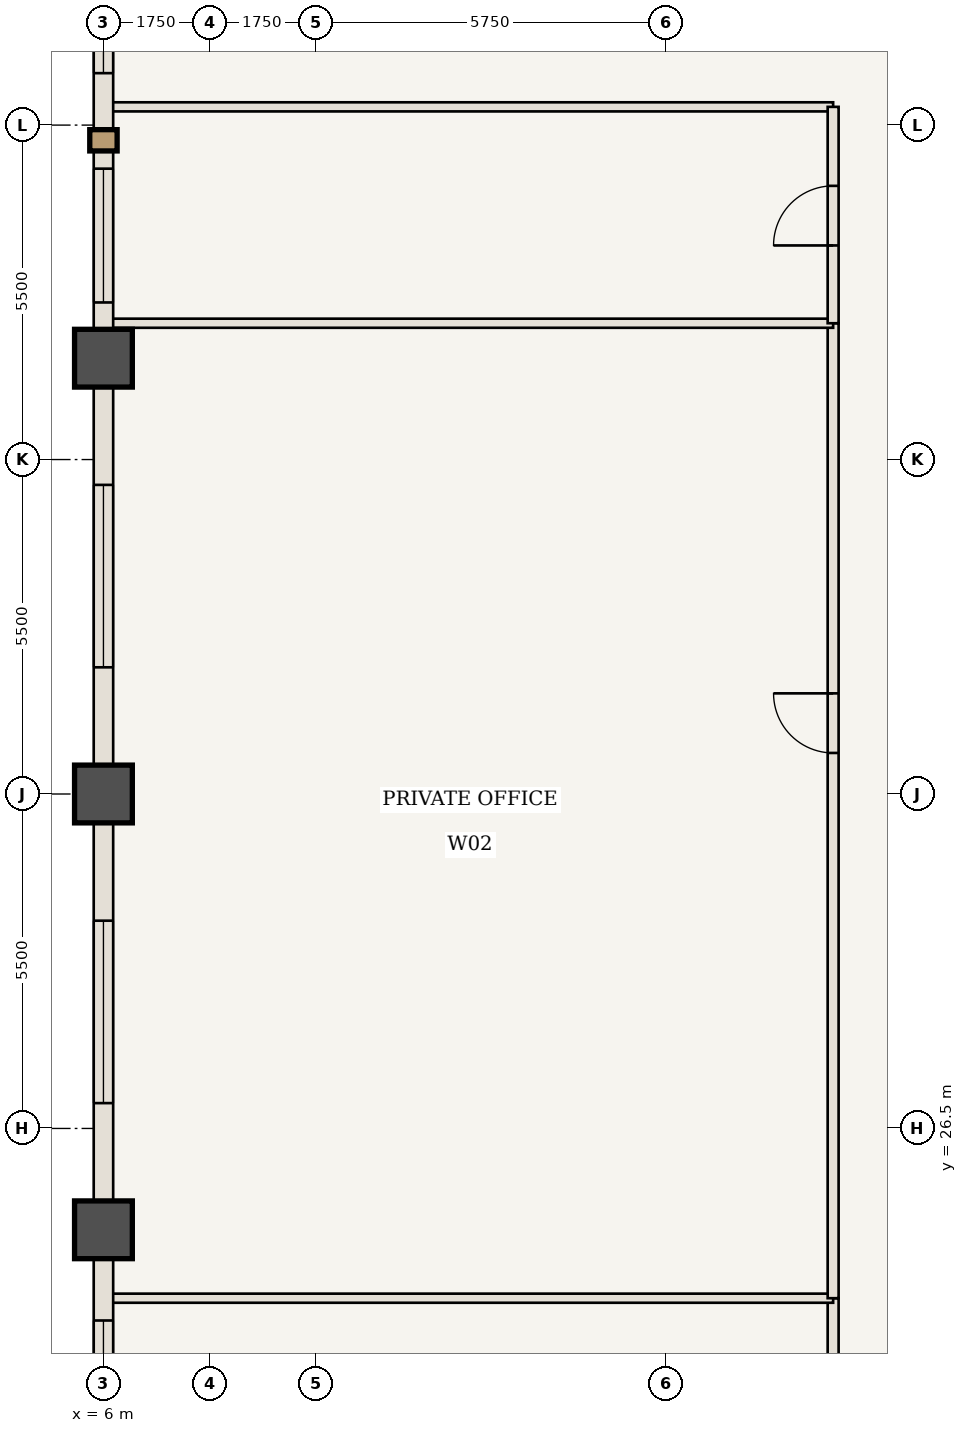
"""IFC4 building model, lengths in metres.
Left out: names, types, materials, properties, quantities, classifications, styles, units other than length and angle.
Written with IfcOpenShell. Run it as: python <this file> out.ifc"""

import sys

from ifc_helpers import new_model, si_unit, direction, frame, frame_2d, origin, origin_2d, place, context, subcontext, project, spatial, rectangle, extrude, element, fill, save


model = new_model("IFC4")
c1 = context("Model", 3, precision=1e-05, world=origin(), true_north=direction((0.0, 1.0)))
c2 = subcontext(c1, "Body", "Model", "MODEL_VIEW")
j1 = project(units=[si_unit("LENGTHUNIT", "METRE"), si_unit("PLANEANGLEUNIT", "RADIAN")], contexts=[c1])
p1 = place(None, origin())
s1 = spatial("IfcSite", under=j1, at=p1, CompositionType="ELEMENT")
p2 = place(p1, origin())
s2 = spatial("IfcBuilding", under=s1, at=p2, CompositionType="ELEMENT")
p3 = place(p2, frame((0.0, 0.0, 129.85)))
s3 = spatial("IfcBuildingStorey", under=s2, at=p3, CompositionType="ELEMENT", Elevation=129.85)
for number, where, z_axis, x_axis in (
    (1, (6.0, 24.833, 0.0), (0.0, 0.0, 1.0), (1.0, 0.0, 0.0)),
    (2, (6.0, 32.0, 0.0), (0.0, 0.0, 1.0), (1.0, 0.0, 0.0)),
    (3, (6.0, 39.167, 0.0), (0.0, 0.0, 1.0), (1.0, 0.0, 0.0)),
):
    element("IfcColumn", number, at=place(p3, frame(where, z_axis=z_axis, x_axis=x_axis)), inside=s3, PredefinedType="COLUMN", context=c2, shape_type="SweptSolid", body=[
        extrude(rectangle(XDim=0.95, YDim=0.95, at=origin_2d()), origin(), (0.0, 0.0, 1.0), 3.85),
    ])
p4 = place(p3, frame((6.06, 43.3, 0.0), z_axis=(0.0, 0.0, 1.0), x_axis=(1.0, 0.0, 0.0)))
e4 = element("IfcWall", 4, at=p4, inside=s3, PredefinedType="STANDARD", context=c2, shape_type="SweptSolid", body=[
    extrude(rectangle(XDim=11.94, YDim=0.15, at=frame_2d((5.97, 0.0))), origin(), (0.0, 0.0, 1.0), 3.065),
])
p5 = place(p3, frame((18.0, 20.7, 0.0), z_axis=(0.0, 0.0, 1.0), x_axis=(0.0, 1.0, 0.0)))
e5 = element("IfcWall", 5, at=p5, inside=s3, PredefinedType="STANDARD", context=c2, shape_type="SweptSolid", body=[
    extrude(rectangle(XDim=3.008, YDim=0.18, at=frame_2d((1.504, 0.0))), origin(), (0.0, 0.0, 1.0), 3.685),
])
p6 = place(p5, frame((1.004, 0.0, 0.0)))
e6 = element("IfcOpeningElement", 6, at=p6, cuts=e5, PredefinedType="OPENING", context=c2, shape_type="SweptSolid", body=[
    extrude(rectangle(XDim=0.98, YDim=2.2, at=frame_2d((0.49, 1.1))), frame((0.0, 0.1, 0.0), z_axis=(0.0, -1.0, 0.0), x_axis=(1.0, 0.0, 0.0)), (0.0, 0.0, 1.0), 0.2),
])
p7 = place(p3, frame((6.06, 23.708, 0.0), z_axis=(0.0, 0.0, 1.0), x_axis=(1.0, 0.0, 0.0)))
e7 = element("IfcWall", 7, at=p7, inside=s3, PredefinedType="STANDARD", context=c2, shape_type="SweptSolid", body=[
    extrude(rectangle(XDim=11.94, YDim=0.15, at=frame_2d((5.97, 0.0))), origin(), (0.0, 0.0, 1.0), 3.685),
])
p8 = place(p3, frame((18.0, 23.708, 0.0), z_axis=(0.0, 0.0, 1.0), x_axis=(0.0, 1.0, 0.0)))
e8 = element("IfcWall", 8, at=p8, inside=s3, PredefinedType="STANDARD", context=c2, shape_type="SweptSolid", body=[
    extrude(rectangle(XDim=16.033, YDim=0.18, at=frame_2d((8.017, 0.0))), origin(), (0.0, 0.0, 1.0), 3.685),
])
p9 = place(p8, frame((8.967, 0.0, 0.0)))
e9 = element("IfcOpeningElement", 9, at=p9, cuts=e8, PredefinedType="OPENING", context=c2, shape_type="SweptSolid", body=[
    extrude(rectangle(XDim=0.98, YDim=2.2, at=frame_2d((0.49, 1.1))), frame((0.0, 0.1, 0.0), z_axis=(0.0, -1.0, 0.0), x_axis=(1.0, 0.0, 0.0)), (0.0, 0.0, 1.0), 0.2),
])
p10 = place(p3, frame((6.06, 39.742, 0.0), z_axis=(0.0, 0.0, 1.0), x_axis=(1.0, 0.0, 0.0)))
e10 = element("IfcWall", 10, at=p10, inside=s3, PredefinedType="STANDARD", context=c2, shape_type="SweptSolid", body=[
    extrude(rectangle(XDim=11.94, YDim=0.15, at=frame_2d((5.97, 0.0))), origin(), (0.0, 0.0, 1.0), 3.685),
])
p11 = place(p3, frame((18.0, 39.742, 0.0), z_axis=(0.0, 0.0, 1.0), x_axis=(0.0, 1.0, 0.0)))
e11 = element("IfcWall", 11, at=p11, inside=s3, PredefinedType="STANDARD", context=c2, shape_type="SweptSolid", body=[
    extrude(rectangle(XDim=3.558, YDim=0.18, at=frame_2d((1.779, 0.0))), origin(), (0.0, 0.0, 1.0), 3.685),
])
p12 = place(p11, frame((1.279, 0.0, 0.0)))
e12 = element("IfcOpeningElement", 12, at=p12, cuts=e11, PredefinedType="OPENING", context=c2, shape_type="SweptSolid", body=[
    extrude(rectangle(XDim=0.98, YDim=2.2, at=frame_2d((0.49, 1.1))), frame((0.0, 0.1, 0.0), z_axis=(0.0, -1.0, 0.0), x_axis=(1.0, 0.0, 0.0)), (0.0, 0.0, 1.0), 0.2),
])
p13 = place(p3, frame((6.0, 17.667, 0.0), z_axis=(0.0, 0.0, 1.0), x_axis=(0.0, 1.0, 0.0)))
e13 = element("IfcWall", 13, at=p13, inside=s3, PredefinedType="USERDEFINED", context=c2, shape_type="SweptSolid", body=[
    extrude(rectangle(XDim=7.167, YDim=0.32, at=frame_2d((3.583, 0.0))), origin(), (0.0, 0.0, 1.0), 2.885),
])
p14 = place(p13, frame((0.879, 0.0, 0.85)))
e14 = element("IfcOpeningElement", 14, at=p14, cuts=e13, PredefinedType="OPENING", context=c2, shape_type="SweptSolid", body=[
    extrude(rectangle(XDim=1.6, YDim=1.835, at=frame_2d((0.8, 0.917))), frame((0.0, 0.17, 0.0), z_axis=(0.0, -1.0, 0.0), x_axis=(1.0, 0.0, 0.0)), (0.0, 0.0, 1.0), 0.34),
])
p15 = place(p13, frame((4.075, 0.0, 0.85)))
e15 = element("IfcOpeningElement", 15, at=p15, cuts=e13, PredefinedType="OPENING", context=c2, shape_type="SweptSolid", body=[
    extrude(rectangle(XDim=1.6, YDim=1.835, at=frame_2d((0.8, 0.917))), frame((0.0, 0.17, 0.0), z_axis=(0.0, -1.0, 0.0), x_axis=(1.0, 0.0, 0.0)), (0.0, 0.0, 1.0), 0.34),
])
p16 = place(p3, frame((6.0, 24.833, 0.0), z_axis=(0.0, 0.0, 1.0), x_axis=(0.0, 1.0, 0.0)))
e16 = element("IfcWall", 16, at=p16, inside=s3, PredefinedType="USERDEFINED", context=c2, shape_type="SweptSolid", body=[
    extrude(rectangle(XDim=7.167, YDim=0.32, at=frame_2d((3.583, 0.0))), origin(), (0.0, 0.0, 1.0), 2.885),
])
p17 = place(p16, frame((2.083, 0.0, 0.85)))
e17 = element("IfcOpeningElement", 17, at=p17, cuts=e16, PredefinedType="OPENING", context=c2, shape_type="SweptSolid", body=[
    extrude(rectangle(XDim=3.0, YDim=1.835, at=frame_2d((1.5, 0.917))), frame((0.0, 0.17, 0.0), z_axis=(0.0, -1.0, 0.0), x_axis=(1.0, 0.0, 0.0)), (0.0, 0.0, 1.0), 0.34),
])
p18 = place(p3, frame((6.0, 32.0, 0.0), z_axis=(0.0, 0.0, 1.0), x_axis=(0.0, 1.0, 0.0)))
e18 = element("IfcWall", 18, at=p18, inside=s3, PredefinedType="USERDEFINED", context=c2, shape_type="SweptSolid", body=[
    extrude(rectangle(XDim=7.167, YDim=0.32, at=frame_2d((3.583, 0.0))), origin(), (0.0, 0.0, 1.0), 2.885),
])
p19 = place(p18, frame((2.083, 0.0, 0.85)))
e19 = element("IfcOpeningElement", 19, at=p19, cuts=e18, PredefinedType="OPENING", context=c2, shape_type="SweptSolid", body=[
    extrude(rectangle(XDim=3.0, YDim=1.835, at=frame_2d((1.5, 0.917))), frame((0.0, 0.17, 0.0), z_axis=(0.0, -1.0, 0.0), x_axis=(1.0, 0.0, 0.0)), (0.0, 0.0, 1.0), 0.34),
])
p20 = place(p3, frame((6.0, 39.167, 0.0), z_axis=(0.0, 0.0, 1.0), x_axis=(0.0, 1.0, 0.0)))
e20 = element("IfcWall", 20, at=p20, inside=s3, PredefinedType="USERDEFINED", context=c2, shape_type="SweptSolid", body=[
    extrude(rectangle(XDim=7.167, YDim=0.32, at=frame_2d((3.583, 0.0))), origin(), (0.0, 0.0, 1.0), 2.885),
])
p21 = place(p20, frame((0.917, 0.0, 0.85)))
e21 = element("IfcOpeningElement", 21, at=p21, cuts=e20, PredefinedType="OPENING", context=c2, shape_type="SweptSolid", body=[
    extrude(rectangle(XDim=2.2, YDim=1.835, at=frame_2d((1.1, 0.917))), frame((0.0, 0.17, 0.0), z_axis=(0.0, -1.0, 0.0), x_axis=(1.0, 0.0, 0.0)), (0.0, 0.0, 1.0), 0.34),
])
p22 = place(p20, frame((4.688, 0.0, 0.85)))
e22 = element("IfcOpeningElement", 22, at=p22, cuts=e20, PredefinedType="OPENING", context=c2, shape_type="SweptSolid", body=[
    extrude(rectangle(XDim=1.6, YDim=1.835, at=frame_2d((0.8, 0.917))), frame((0.0, 0.17, 0.0), z_axis=(0.0, -1.0, 0.0), x_axis=(1.0, 0.0, 0.0)), (0.0, 0.0, 1.0), 0.34),
])
p23 = place(p9, origin())
e23 = element("IfcDoor", 23, at=p23, inside=s3, OperationType="SINGLE_SWING_RIGHT", PredefinedType="DOOR", context=c2, shape_type="SweptSolid", body=[
    extrude(rectangle(XDim=0.98, YDim=2.2, at=frame_2d((0.49, 1.1))), frame((0.0, 0.025, 0.0), z_axis=(0.0, -1.0, 0.0), x_axis=(1.0, 0.0, 0.0)), (0.0, 0.0, 1.0), 0.05),
])
fill(e9, e23)
p24 = place(p12, origin())
e24 = element("IfcDoor", 24, at=p24, inside=s3, OperationType="SINGLE_SWING_LEFT", PredefinedType="DOOR", context=c2, shape_type="SweptSolid", body=[
    extrude(rectangle(XDim=0.98, YDim=2.2, at=frame_2d((0.49, 1.1))), frame((0.0, 0.025, 0.0), z_axis=(0.0, -1.0, 0.0), x_axis=(1.0, 0.0, 0.0)), (0.0, 0.0, 1.0), 0.05),
])
fill(e12, e24)
p25 = place(p15, origin())
e25 = element("IfcWindow", 25, at=p25, inside=s3, PartitioningType="SINGLE_PANEL", PredefinedType="WINDOW", context=c2, shape_type="SweptSolid", body=[
    extrude(rectangle(XDim=1.6, YDim=1.835, at=frame_2d((0.8, 0.917))), frame((0.0, 0.03, 0.0), z_axis=(0.0, -1.0, 0.0), x_axis=(1.0, 0.0, 0.0)), (0.0, 0.0, 1.0), 0.06),
])
fill(e15, e25)
p26 = place(p17, origin())
e26 = element("IfcWindow", 26, at=p26, inside=s3, PartitioningType="SINGLE_PANEL", PredefinedType="WINDOW", context=c2, shape_type="SweptSolid", body=[
    extrude(rectangle(XDim=3.0, YDim=1.835, at=frame_2d((1.5, 0.917))), frame((0.0, 0.03, 0.0), z_axis=(0.0, -1.0, 0.0), x_axis=(1.0, 0.0, 0.0)), (0.0, 0.0, 1.0), 0.06),
])
fill(e17, e26)
p27 = place(p19, origin())
e27 = element("IfcWindow", 27, at=p27, inside=s3, PartitioningType="SINGLE_PANEL", PredefinedType="WINDOW", context=c2, shape_type="SweptSolid", body=[
    extrude(rectangle(XDim=3.0, YDim=1.835, at=frame_2d((1.5, 0.917))), frame((0.0, 0.03, 0.0), z_axis=(0.0, -1.0, 0.0), x_axis=(1.0, 0.0, 0.0)), (0.0, 0.0, 1.0), 0.06),
])
fill(e19, e27)
p28 = place(p21, origin())
e28 = element("IfcWindow", 28, at=p28, inside=s3, PartitioningType="SINGLE_PANEL", PredefinedType="WINDOW", context=c2, shape_type="SweptSolid", body=[
    extrude(rectangle(XDim=2.2, YDim=1.835, at=frame_2d((1.1, 0.917))), frame((0.0, 0.03, 0.0), z_axis=(0.0, -1.0, 0.0), x_axis=(1.0, 0.0, 0.0)), (0.0, 0.0, 1.0), 0.06),
])
fill(e21, e28)
p29 = place(p22, origin())
e29 = element("IfcWindow", 29, at=p29, inside=s3, PartitioningType="SINGLE_PANEL", PredefinedType="WINDOW", context=c2, shape_type="SweptSolid", body=[
    extrude(rectangle(XDim=1.6, YDim=1.835, at=frame_2d((0.8, 0.917))), frame((0.0, 0.03, 0.0), z_axis=(0.0, -1.0, 0.0), x_axis=(1.0, 0.0, 0.0)), (0.0, 0.0, 1.0), 0.06),
])
fill(e22, e29)
save(model, sys.argv[1])
